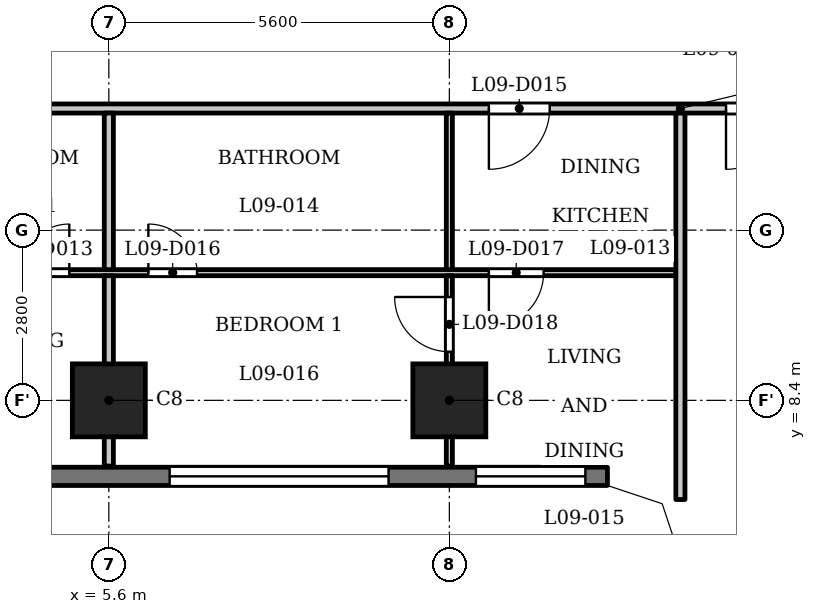
"""IFC4 building model, lengths in metres.
Left out: names, types, materials, properties, quantities, classifications, styles, units other than length and angle.
Written with IfcOpenShell. Run it as: python <this file> out.ifc"""

import sys

from ifc_helpers import new_model, si_unit, direction, frame, frame_2d, origin, origin_2d, place, context, subcontext, project, spatial, polyline, rectangle, outline, extrude, element, fill, save


model = new_model("IFC4")
c1 = context("Model", 3, precision=1e-05, world=origin(), true_north=direction((0.0, 1.0)))
c2 = subcontext(c1, "Body", "Model", "MODEL_VIEW")
j1 = project(units=[si_unit("LENGTHUNIT", "METRE"), si_unit("PLANEANGLEUNIT", "RADIAN")], contexts=[c1])
p1 = place(None, origin())
s1 = spatial("IfcSite", under=j1, at=p1, CompositionType="ELEMENT")
p2 = place(p1, origin())
s2 = spatial("IfcBuilding", under=s1, at=p2, CompositionType="ELEMENT")
p3 = place(p2, frame((0.0, 0.0, 41.0)))
s3 = spatial("IfcBuildingStorey", under=s2, at=p3, CompositionType="ELEMENT", Elevation=41.0)
for number, where, z_axis, x_axis in (
    (1, (5.6, 8.4, 0.0), (0.0, 0.0, 1.0), (1.0, 0.0, 0.0)),
    (2, (11.2, 8.4, 0.0), (0.0, 0.0, 1.0), (1.0, 0.0, 0.0)),
):
    element("IfcColumn", number, at=place(p3, frame(where, z_axis=z_axis, x_axis=x_axis)), inside=s3, PredefinedType="COLUMN", context=c2, shape_type="SweptSolid", body=[
        extrude(rectangle(XDim=1.2, YDim=1.2, at=origin_2d()), origin(), (0.0, 0.0, 1.0), 3.5),
    ])
p4 = place(p3, frame((-13.8, 7.15, 0.0), z_axis=(0.0, 0.0, 1.0), x_axis=(1.0, 0.0, 0.0)))
e3 = element("IfcWall", 3, at=p4, inside=s3, PredefinedType="SOLIDWALL", context=c2, shape_type="SweptSolid", body=[
    extrude(rectangle(XDim=27.6, YDim=0.3, at=frame_2d((13.8, 0.0))), origin(), (0.0, 0.0, 1.0), 3.2),
])
p5 = place(p4, frame((0.363, 0.0, 0.9)))
e4 = element("IfcOpeningElement", 4, at=p5, cuts=e3, PredefinedType="OPENING", context=c2, shape_type="SweptSolid", body=[
    extrude(rectangle(XDim=1.8, YDim=1.25, at=frame_2d((0.9, 0.625))), frame((0.0, 0.16, 0.0), z_axis=(0.0, -1.0, 0.0), x_axis=(1.0, 0.0, 0.0)), (0.0, 0.0, 1.0), 0.32),
])
p6 = place(p4, frame((3.6, 0.0, 1.2)))
e5 = element("IfcOpeningElement", 5, at=p6, cuts=e3, PredefinedType="OPENING", context=c2, shape_type="SweptSolid", body=[
    extrude(rectangle(XDim=3.6, YDim=0.95, at=frame_2d((1.8, 0.475))), frame((0.0, 0.16, 0.0), z_axis=(0.0, -1.0, 0.0), x_axis=(1.0, 0.0, 0.0)), (0.0, 0.0, 1.0), 0.32),
])
p7 = place(p4, frame((9.2, 0.0, 1.2)))
e6 = element("IfcOpeningElement", 6, at=p7, cuts=e3, PredefinedType="OPENING", context=c2, shape_type="SweptSolid", body=[
    extrude(rectangle(XDim=3.6, YDim=0.95, at=frame_2d((1.8, 0.475))), frame((0.0, 0.16, 0.0), z_axis=(0.0, -1.0, 0.0), x_axis=(1.0, 0.0, 0.0)), (0.0, 0.0, 1.0), 0.32),
])
p8 = place(p4, frame((14.8, 0.0, 1.2)))
e7 = element("IfcOpeningElement", 7, at=p8, cuts=e3, PredefinedType="OPENING", context=c2, shape_type="SweptSolid", body=[
    extrude(rectangle(XDim=3.6, YDim=0.95, at=frame_2d((1.8, 0.475))), frame((0.0, 0.16, 0.0), z_axis=(0.0, -1.0, 0.0), x_axis=(1.0, 0.0, 0.0)), (0.0, 0.0, 1.0), 0.32),
])
p9 = place(p4, frame((20.4, 0.0, 1.2)))
e8 = element("IfcOpeningElement", 8, at=p9, cuts=e3, PredefinedType="OPENING", context=c2, shape_type="SweptSolid", body=[
    extrude(rectangle(XDim=3.6, YDim=0.95, at=frame_2d((1.8, 0.475))), frame((0.0, 0.16, 0.0), z_axis=(0.0, -1.0, 0.0), x_axis=(1.0, 0.0, 0.0)), (0.0, 0.0, 1.0), 0.32),
])
p10 = place(p4, frame((25.438, 0.0, 0.9)))
e9 = element("IfcOpeningElement", 9, at=p10, cuts=e3, PredefinedType="OPENING", context=c2, shape_type="SweptSolid", body=[
    extrude(rectangle(XDim=1.8, YDim=1.25, at=frame_2d((0.9, 0.625))), frame((0.0, 0.16, 0.0), z_axis=(0.0, -1.0, 0.0), x_axis=(1.0, 0.0, 0.0)), (0.0, 0.0, 1.0), 0.32),
])
p11 = place(p3, frame((-14.925, 10.5, 0.0), z_axis=(0.0, 0.0, 1.0), x_axis=(1.0, 0.0, 0.0)))
e10 = element("IfcWall", 10, at=p11, inside=s3, PredefinedType="PARTITIONING", context=c2, shape_type="SweptSolid", body=[
    extrude(rectangle(XDim=29.85, YDim=0.1, at=frame_2d((14.925, 0.0))), origin(), (0.0, 0.0, 1.0), 3.2),
])
p12 = place(p11, frame((4.375, 0.0, 0.0)))
e11 = element("IfcOpeningElement", 11, at=p12, cuts=e10, PredefinedType="OPENING", context=c2, shape_type="SweptSolid", body=[
    extrude(rectangle(XDim=0.8, YDim=2.1, at=frame_2d((0.4, 1.05))), frame((0.0, 0.06, 0.0), z_axis=(0.0, -1.0, 0.0), x_axis=(1.0, 0.0, 0.0)), (0.0, 0.0, 1.0), 0.12),
])
p13 = place(p11, frame((0.575, 0.0, 0.0)))
e12 = element("IfcOpeningElement", 12, at=p13, cuts=e10, PredefinedType="OPENING", context=c2, shape_type="SweptSolid", body=[
    extrude(rectangle(XDim=0.9, YDim=2.1, at=frame_2d((0.45, 1.05))), frame((0.0, 0.06, 0.0), z_axis=(0.0, -1.0, 0.0), x_axis=(1.0, 0.0, 0.0)), (0.0, 0.0, 1.0), 0.12),
])
p14 = place(p11, frame((13.475, 0.0, 0.0)))
e13 = element("IfcOpeningElement", 13, at=p14, cuts=e10, PredefinedType="OPENING", context=c2, shape_type="SweptSolid", body=[
    extrude(rectangle(XDim=0.8, YDim=2.1, at=frame_2d((0.4, 1.05))), frame((0.0, 0.06, 0.0), z_axis=(0.0, -1.0, 0.0), x_axis=(1.0, 0.0, 0.0)), (0.0, 0.0, 1.0), 0.12),
])
p15 = place(p11, frame((9.975, 0.0, 0.0)))
e14 = element("IfcOpeningElement", 14, at=p15, cuts=e10, PredefinedType="OPENING", context=c2, shape_type="SweptSolid", body=[
    extrude(rectangle(XDim=0.9, YDim=2.1, at=frame_2d((0.45, 1.05))), frame((0.0, 0.06, 0.0), z_axis=(0.0, -1.0, 0.0), x_axis=(1.0, 0.0, 0.0)), (0.0, 0.0, 1.0), 0.12),
])
p16 = place(p11, frame((19.075, 0.0, 0.0)))
e15 = element("IfcOpeningElement", 15, at=p16, cuts=e10, PredefinedType="OPENING", context=c2, shape_type="SweptSolid", body=[
    extrude(rectangle(XDim=0.8, YDim=2.1, at=frame_2d((0.4, 1.05))), frame((0.0, 0.06, 0.0), z_axis=(0.0, -1.0, 0.0), x_axis=(1.0, 0.0, 0.0)), (0.0, 0.0, 1.0), 0.12),
])
p17 = place(p11, frame((16.075, 0.0, 0.0)))
e16 = element("IfcOpeningElement", 16, at=p17, cuts=e10, PredefinedType="OPENING", context=c2, shape_type="SweptSolid", body=[
    extrude(rectangle(XDim=0.9, YDim=2.1, at=frame_2d((0.45, 1.05))), frame((0.0, 0.06, 0.0), z_axis=(0.0, -1.0, 0.0), x_axis=(1.0, 0.0, 0.0)), (0.0, 0.0, 1.0), 0.12),
])
p18 = place(p11, frame((21.175, 0.0, 0.0)))
e17 = element("IfcOpeningElement", 17, at=p18, cuts=e10, PredefinedType="OPENING", context=c2, shape_type="SweptSolid", body=[
    extrude(rectangle(XDim=0.8, YDim=2.1, at=frame_2d((0.4, 1.05))), frame((0.0, 0.06, 0.0), z_axis=(0.0, -1.0, 0.0), x_axis=(1.0, 0.0, 0.0)), (0.0, 0.0, 1.0), 0.12),
])
p19 = place(p11, frame((26.775, 0.0, 0.0)))
e18 = element("IfcOpeningElement", 18, at=p19, cuts=e10, PredefinedType="OPENING", context=c2, shape_type="SweptSolid", body=[
    extrude(rectangle(XDim=0.9, YDim=2.1, at=frame_2d((0.45, 1.05))), frame((0.0, 0.06, 0.0), z_axis=(0.0, -1.0, 0.0), x_axis=(1.0, 0.0, 0.0)), (0.0, 0.0, 1.0), 0.12),
])
p20 = place(p3, frame((-17.4, 13.2, 0.0), z_axis=(0.0, 0.0, 1.0), x_axis=(1.0, 0.0, 0.0)))
e19 = element("IfcWall", 19, at=p20, inside=s3, PredefinedType="PARTITIONING", context=c2, shape_type="SweptSolid", body=[
    extrude(rectangle(XDim=34.8, YDim=0.15, at=frame_2d((17.4, 0.0))), origin(), (0.0, 0.0, 1.0), 3.2),
])
p21 = place(p20, frame((0.75, 0.0, 0.0)))
e20 = element("IfcOpeningElement", 20, at=p21, cuts=e19, PredefinedType="OPENING", context=c2, shape_type="SweptSolid", body=[
    extrude(rectangle(XDim=1.0, YDim=2.1, at=frame_2d((0.5, 1.05))), frame((0.0, 0.085, 0.0), z_axis=(0.0, -1.0, 0.0), x_axis=(1.0, 0.0, 0.0)), (0.0, 0.0, 1.0), 0.17),
])
p22 = place(p20, frame((33.15, 0.0, 0.0)))
e21 = element("IfcOpeningElement", 21, at=p22, cuts=e19, PredefinedType="OPENING", context=c2, shape_type="SweptSolid", body=[
    extrude(rectangle(XDim=1.0, YDim=2.1, at=frame_2d((0.5, 1.05))), frame((0.0, 0.085, 0.0), z_axis=(0.0, -1.0, 0.0), x_axis=(1.0, 0.0, 0.0)), (0.0, 0.0, 1.0), 0.17),
])
p23 = place(p20, frame((3.05, 0.0, 0.0)))
e22 = element("IfcOpeningElement", 22, at=p23, cuts=e19, PredefinedType="OPENING", context=c2, shape_type="SweptSolid", body=[
    extrude(rectangle(XDim=1.0, YDim=2.1, at=frame_2d((0.5, 1.05))), frame((0.0, 0.085, 0.0), z_axis=(0.0, -1.0, 0.0), x_axis=(1.0, 0.0, 0.0)), (0.0, 0.0, 1.0), 0.17),
])
p24 = place(p20, frame((12.45, 0.0, 0.0)))
e23 = element("IfcOpeningElement", 23, at=p24, cuts=e19, PredefinedType="OPENING", context=c2, shape_type="SweptSolid", body=[
    extrude(rectangle(XDim=1.0, YDim=2.1, at=frame_2d((0.5, 1.05))), frame((0.0, 0.085, 0.0), z_axis=(0.0, -1.0, 0.0), x_axis=(1.0, 0.0, 0.0)), (0.0, 0.0, 1.0), 0.17),
])
p25 = place(p20, frame((18.3, 0.0, 0.0)))
e24 = element("IfcOpeningElement", 24, at=p25, cuts=e19, PredefinedType="OPENING", context=c2, shape_type="SweptSolid", body=[
    extrude(rectangle(XDim=1.0, YDim=2.1, at=frame_2d((0.5, 1.05))), frame((0.0, 0.085, 0.0), z_axis=(0.0, -1.0, 0.0), x_axis=(1.0, 0.0, 0.0)), (0.0, 0.0, 1.0), 0.17),
])
p26 = place(p20, frame((29.25, 0.0, 0.0)))
e25 = element("IfcOpeningElement", 25, at=p26, cuts=e19, PredefinedType="OPENING", context=c2, shape_type="SweptSolid", body=[
    extrude(rectangle(XDim=1.0, YDim=2.1, at=frame_2d((0.5, 1.05))), frame((0.0, 0.085, 0.0), z_axis=(0.0, -1.0, 0.0), x_axis=(1.0, 0.0, 0.0)), (0.0, 0.0, 1.0), 0.17),
])
p27 = place(p3, frame((5.6, 7.32, 0.0), z_axis=(0.0, 0.0, 1.0), x_axis=(0.0, 1.0, 0.0)))
e26 = element("IfcWall", 26, at=p27, inside=s3, PredefinedType="PARTITIONING", context=c2, shape_type="SweptSolid", body=[
    extrude(rectangle(XDim=3.13, YDim=0.15, at=frame_2d((1.565, 0.0))), origin(), (0.0, 0.0, 1.0), 3.2),
])
p28 = place(p3, frame((5.6, 10.55, 0.0), z_axis=(0.0, 0.0, 1.0), x_axis=(0.0, 1.0, 0.0)))
e27 = element("IfcWall", 27, at=p28, inside=s3, PredefinedType="PARTITIONING", context=c2, shape_type="SweptSolid", body=[
    extrude(rectangle(XDim=2.575, YDim=0.15, at=frame_2d((1.288, 0.0))), origin(), (0.0, 0.0, 1.0), 3.2),
])
p29 = place(p3, frame((11.2, 7.32, 0.0), z_axis=(0.0, 0.0, 1.0), x_axis=(0.0, 1.0, 0.0)))
e28 = element("IfcWall", 28, at=p29, inside=s3, PredefinedType="PARTITIONING", context=c2, shape_type="SweptSolid", body=[
    extrude(rectangle(XDim=3.13, YDim=0.1, at=frame_2d((1.565, 0.0))), origin(), (0.0, 0.0, 1.0), 3.2),
])
p30 = place(p29, frame((1.88, 0.0, 0.0)))
e29 = element("IfcOpeningElement", 29, at=p30, cuts=e28, PredefinedType="OPENING", context=c2, shape_type="SweptSolid", body=[
    extrude(rectangle(XDim=0.9, YDim=2.1, at=frame_2d((0.45, 1.05))), frame((0.0, 0.06, 0.0), z_axis=(0.0, -1.0, 0.0), x_axis=(1.0, 0.0, 0.0)), (0.0, 0.0, 1.0), 0.12),
])
p31 = place(p3, frame((11.2, 10.55, 0.0), z_axis=(0.0, 0.0, 1.0), x_axis=(0.0, 1.0, 0.0)))
e30 = element("IfcWall", 30, at=p31, inside=s3, PredefinedType="PARTITIONING", context=c2, shape_type="SweptSolid", body=[
    extrude(rectangle(XDim=2.575, YDim=0.1, at=frame_2d((1.288, 0.0))), origin(), (0.0, 0.0, 1.0), 3.2),
])
p32 = place(p3, frame((15.0, 6.769, 0.0), z_axis=(0.0, 0.0, 1.0), x_axis=(0.0, 1.0, 0.0)))
e31 = element("IfcWall", 31, at=p32, inside=s3, PredefinedType="PARTITIONING", context=c2, shape_type="SweptSolid", body=[
    extrude(rectangle(XDim=6.356, YDim=0.15, at=frame_2d((3.178, 0.0))), origin(), (0.0, 0.0, 1.0), 3.2),
])
p33 = place(p3, origin())
e32 = element("IfcWall", 32, at=p33, inside=s3, PredefinedType="SOLIDWALL", context=c2, shape_type="SweptSolid", body=[
    extrude(outline(polyline([(14.937, 6.937), (13.849, 7.3), (13.8, 7.3), (13.8, 7.0), (14.7, 6.7), (15.0, 5.8), (15.3, 5.8), (15.3, 5.849), (14.937, 6.937)])), origin(), (0.0, 0.0, 1.0), 3.2),
])
p34 = place(p22, origin())
e33 = element("IfcDoor", 33, at=p34, inside=s3, OperationType="SINGLE_SWING_LEFT", PredefinedType="DOOR", context=c2, shape_type="SweptSolid", body=[
    extrude(rectangle(XDim=1.0, YDim=2.1, at=frame_2d((0.5, 1.05))), frame((0.0, 0.025, 0.0), z_axis=(0.0, -1.0, 0.0), x_axis=(1.0, 0.0, 0.0)), (0.0, 0.0, 1.0), 0.05),
])
fill(e21, e33)
p35 = place(p16, origin())
e34 = element("IfcDoor", 34, at=p35, inside=s3, OperationType="SINGLE_SWING_LEFT", PredefinedType="DOOR", context=c2, shape_type="SweptSolid", body=[
    extrude(rectangle(XDim=0.8, YDim=2.1, at=frame_2d((0.4, 1.05))), frame((0.0, 0.025, 0.0), z_axis=(0.0, -1.0, 0.0), x_axis=(1.0, 0.0, 0.0)), (0.0, 0.0, 1.0), 0.05),
])
fill(e15, e34)
p36 = place(p26, origin())
e35 = element("IfcDoor", 35, at=p36, inside=s3, OperationType="SINGLE_SWING_LEFT", PredefinedType="DOOR", context=c2, shape_type="SweptSolid", body=[
    extrude(rectangle(XDim=1.0, YDim=2.1, at=frame_2d((0.5, 1.05))), frame((0.0, 0.025, 0.0), z_axis=(0.0, -1.0, 0.0), x_axis=(1.0, 0.0, 0.0)), (0.0, 0.0, 1.0), 0.05),
])
fill(e25, e35)
p37 = place(p18, origin())
e36 = element("IfcDoor", 36, at=p37, inside=s3, OperationType="SINGLE_SWING_RIGHT", PredefinedType="DOOR", context=c2, shape_type="SweptSolid", body=[
    extrude(rectangle(XDim=0.8, YDim=2.1, at=frame_2d((0.4, 1.05))), frame((0.0, 0.025, 0.0), z_axis=(0.0, -1.0, 0.0), x_axis=(1.0, 0.0, 0.0)), (0.0, 0.0, 1.0), 0.05),
])
fill(e17, e36)
p38 = place(p19, origin())
e37 = element("IfcDoor", 37, at=p38, inside=s3, OperationType="SINGLE_SWING_LEFT", PredefinedType="DOOR", context=c2, shape_type="SweptSolid", body=[
    extrude(rectangle(XDim=0.9, YDim=2.1, at=frame_2d((0.45, 1.05))), frame((0.0, 0.025, 0.0), z_axis=(0.0, -1.0, 0.0), x_axis=(1.0, 0.0, 0.0)), (0.0, 0.0, 1.0), 0.05),
])
fill(e18, e37)
p39 = place(p30, origin())
e38 = element("IfcDoor", 38, at=p39, inside=s3, OperationType="SINGLE_SWING_LEFT", PredefinedType="DOOR", context=c2, shape_type="SweptSolid", body=[
    extrude(rectangle(XDim=0.9, YDim=2.1, at=frame_2d((0.45, 1.05))), frame((0.0, 0.025, 0.0), z_axis=(0.0, -1.0, 0.0), x_axis=(1.0, 0.0, 0.0)), (0.0, 0.0, 1.0), 0.05),
])
fill(e29, e38)
p40 = place(p9, origin())
e39 = element("IfcWindow", 39, at=p40, inside=s3, PartitioningType="SINGLE_PANEL", PredefinedType="WINDOW", context=c2, shape_type="SweptSolid", body=[
    extrude(rectangle(XDim=3.6, YDim=0.95, at=frame_2d((1.8, 0.475))), frame((0.0, 0.03, 0.0), z_axis=(0.0, -1.0, 0.0), x_axis=(1.0, 0.0, 0.0)), (0.0, 0.0, 1.0), 0.06),
])
fill(e8, e39)
p41 = place(p10, origin())
e40 = element("IfcWindow", 40, at=p41, inside=s3, PartitioningType="SINGLE_PANEL", PredefinedType="WINDOW", context=c2, shape_type="SweptSolid", body=[
    extrude(rectangle(XDim=1.8, YDim=1.25, at=frame_2d((0.9, 0.625))), frame((0.0, 0.03, 0.0), z_axis=(0.0, -1.0, 0.0), x_axis=(1.0, 0.0, 0.0)), (0.0, 0.0, 1.0), 0.06),
])
fill(e9, e40)
save(model, sys.argv[1])
